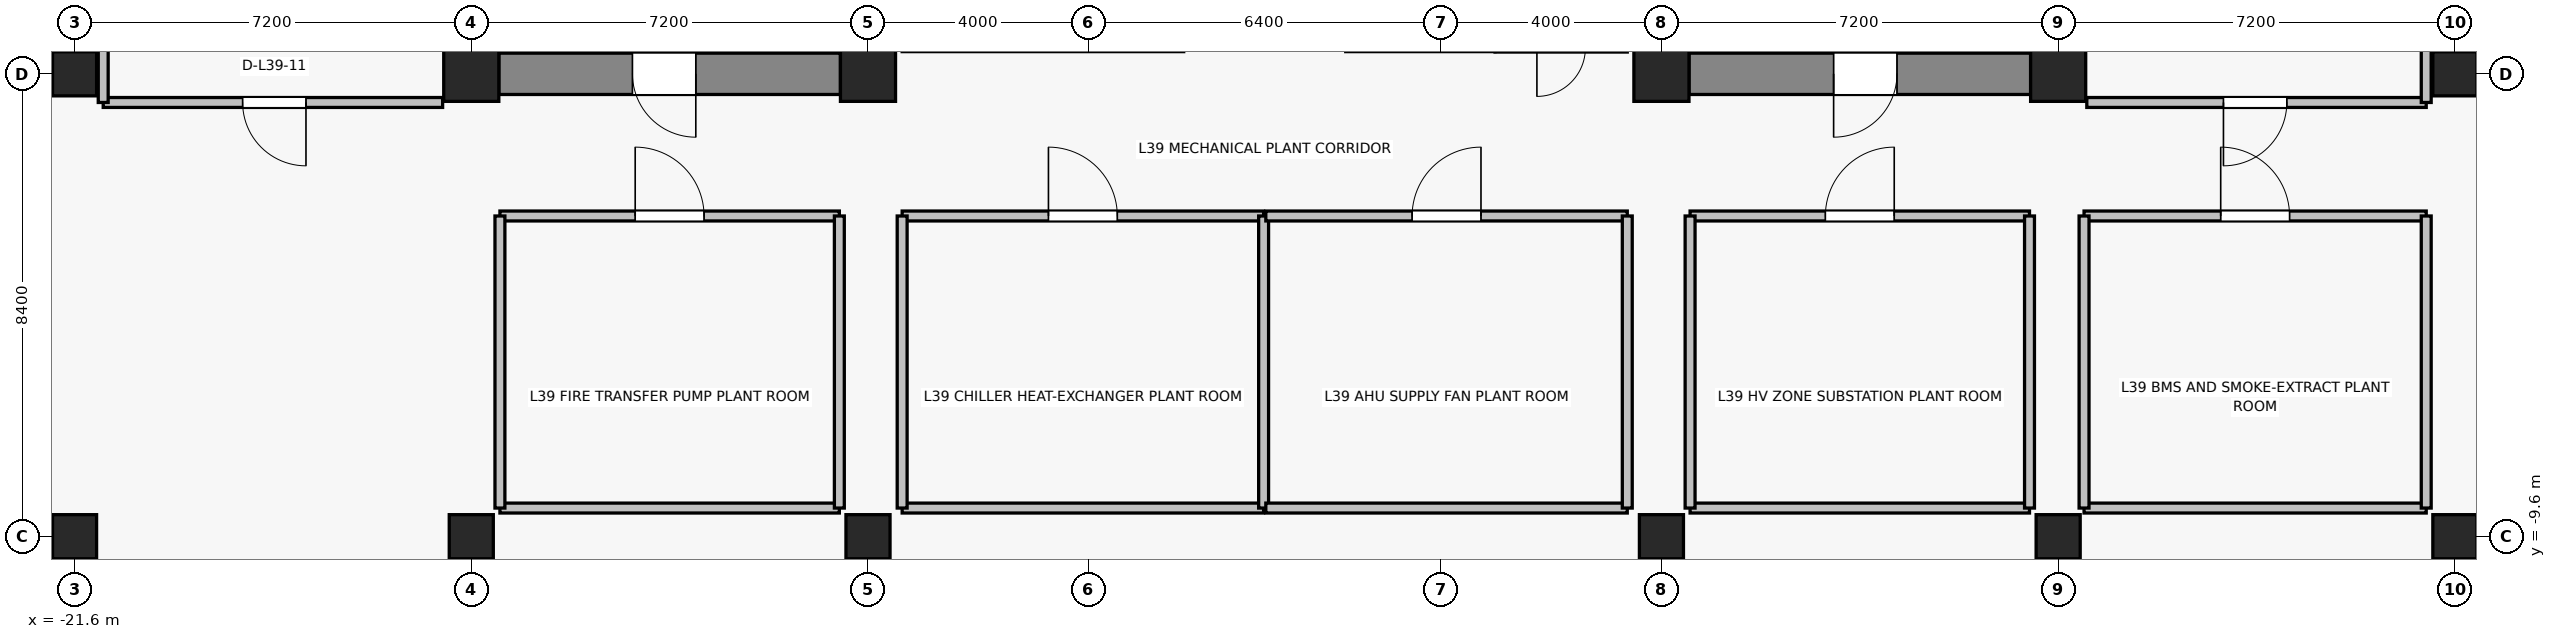
"""IFC4 building model, lengths in metres.
Left out: names, types, materials, properties, quantities, classifications, styles, units other than length and angle.
Written with IfcOpenShell. Run it as: python <this file> out.ifc"""

import sys

from ifc_helpers import new_model, si_unit, direction, frame, frame_2d, origin, origin_2d, place, context, subcontext, project, spatial, rectangle, extrude, source, transform, mapped, element, fill, save


model = new_model("IFC4")
c1 = context("Model", 3, precision=1e-05, world=origin(), true_north=direction((0.0, 1.0)))
c2 = subcontext(c1, "Body", "Model", "MODEL_VIEW")
j1 = project(units=[si_unit("LENGTHUNIT", "METRE"), si_unit("PLANEANGLEUNIT", "RADIAN")], contexts=[c1])
p1 = place(None, origin())
s1 = spatial("IfcSite", under=j1, at=p1, CompositionType="ELEMENT")
p2 = place(p1, origin())
s2 = spatial("IfcBuilding", under=s1, at=p2, CompositionType="ELEMENT")
p3 = place(p2, frame((0.0, 0.0, 139.6)))
s3 = spatial("IfcBuildingStorey", under=s2, at=p3, CompositionType="ELEMENT", Elevation=139.6)
for number, where, z_axis, x_axis in (
    (1, (-14.4, -1.2, 0.0), (0.0, 0.0, 1.0), (1.0, 0.0, 0.0)),
    (2, (-7.2, -1.2, 0.0), (0.0, 0.0, 1.0), (1.0, 0.0, 0.0)),
    (3, (7.2, -1.2, 0.0), (0.0, 0.0, 1.0), (1.0, 0.0, 0.0)),
    (4, (14.4, -1.2, 0.0), (0.0, 0.0, 1.0), (1.0, 0.0, 0.0)),
):
    element("IfcColumn", number, at=place(p3, frame(where, z_axis=z_axis, x_axis=x_axis)), inside=s3, PredefinedType="COLUMN", context=c2, shape_type="SweptSolid", body=[
        extrude(rectangle(XDim=1.0, YDim=1.0, at=origin_2d()), origin(), (0.0, 0.0, 1.0), 6.6),
    ])
for number, where, z_axis, x_axis in (
    (5, (-14.4, -9.6, 0.0), (0.0, 0.0, 1.0), (1.0, 0.0, 0.0)),
    (6, (-7.2, -9.6, 0.0), (0.0, 0.0, 1.0), (1.0, 0.0, 0.0)),
    (7, (7.2, -9.6, 0.0), (0.0, 0.0, 1.0), (1.0, 0.0, 0.0)),
    (8, (14.4, -9.6, 0.0), (0.0, 0.0, 1.0), (1.0, 0.0, 0.0)),
    (9, (-21.6, -9.6, 0.0), (0.0, 0.0, 1.0), (1.0, 0.0, 0.0)),
    (10, (-21.6, -1.2, 0.0), (0.0, 0.0, 1.0), (1.0, 0.0, 0.0)),
    (11, (21.6, -9.6, 0.0), (0.0, 0.0, 1.0), (1.0, 0.0, 0.0)),
    (12, (21.6, -1.2, 0.0), (0.0, 0.0, 1.0), (1.0, 0.0, 0.0)),
):
    element("IfcColumn", number, at=place(p3, frame(where, z_axis=z_axis, x_axis=x_axis)), inside=s3, PredefinedType="COLUMN", context=c2, shape_type="SweptSolid", body=[
        extrude(rectangle(XDim=0.8, YDim=0.8, at=origin_2d()), origin(), (0.0, 0.0, 1.0), 6.6),
    ])
p4 = place(p3, frame((-7.7, -1.2, 0.0), z_axis=(0.0, 0.0, 1.0), x_axis=(-1.0, 0.0, 0.0)))
e13 = element("IfcWall", 13, at=p4, inside=s3, PredefinedType="SHEAR", context=c2, shape_type="SweptSolid", body=[
    extrude(rectangle(XDim=6.2, YDim=0.75, at=frame_2d((3.1, 0.0))), origin(), (0.0, 0.0, 1.0), 6.375),
])
p5 = place(p4, frame((2.625, 0.0, 0.0)))
e14 = element("IfcOpeningElement", 14, at=p5, cuts=e13, PredefinedType="OPENING", context=c2, shape_type="SweptSolid", body=[
    extrude(rectangle(XDim=1.15, YDim=2.15, at=frame_2d((0.575, 1.075))), frame((0.0, 0.385, 0.0), z_axis=(0.0, -1.0, 0.0), x_axis=(1.0, 0.0, 0.0)), (0.0, 0.0, 1.0), 0.77),
])
p6 = place(p3, frame((13.9, -1.2, 0.0), z_axis=(0.0, 0.0, 1.0), x_axis=(-1.0, 0.0, 0.0)))
e15 = element("IfcWall", 15, at=p6, inside=s3, PredefinedType="SHEAR", context=c2, shape_type="SweptSolid", body=[
    extrude(rectangle(XDim=6.2, YDim=0.75, at=frame_2d((3.1, 0.0))), origin(), (0.0, 0.0, 1.0), 6.375),
])
p7 = place(p6, frame((2.425, 0.0, 0.0)))
e16 = element("IfcOpeningElement", 16, at=p7, cuts=e15, PredefinedType="OPENING", context=c2, shape_type="SweptSolid", body=[
    extrude(rectangle(XDim=1.15, YDim=2.15, at=frame_2d((0.575, 1.075))), frame((0.0, 0.385, 0.0), z_axis=(0.0, -1.0, 0.0), x_axis=(1.0, 0.0, 0.0)), (0.0, 0.0, 1.0), 0.77),
])
for number, where, z_axis, x_axis in (
    (17, (-7.4, -0.825, 0.0), (0.0, 0.0, 1.0), (0.0, 1.0, 0.0)),
    (18, (7.4, -0.825, 0.0), (0.0, 0.0, 1.0), (0.0, 1.0, 0.0)),
):
    element("IfcWall", number, at=place(p3, frame(where, z_axis=z_axis, x_axis=x_axis)), inside=s3, PredefinedType="SHEAR", context=c2, shape_type="SweptSolid", body=[
        extrude(rectangle(XDim=4.075, YDim=0.55, at=frame_2d((2.038, 0.0))), origin(), (0.0, 0.0, 1.0), 6.375),
    ])
p8 = place(p3, frame((6.58, -0.73, 0.0), z_axis=(0.0, 0.0, 1.0), x_axis=(-1.0, 0.0, 0.0)))
e19 = element("IfcWall", 19, at=p8, inside=s3, PredefinedType="PARTITIONING", context=c2, shape_type="SweptSolid", body=[
    extrude(rectangle(XDim=2.4, YDim=0.15, at=frame_2d((1.2, 0.0))), origin(), (0.0, 0.0, 1.0), 6.375),
])
p9 = place(p8, frame((0.76, 0.0, 0.0)))
e20 = element("IfcOpeningElement", 20, at=p9, cuts=e19, PredefinedType="OPENING", context=c2, shape_type="SweptSolid", body=[
    extrude(rectangle(XDim=0.88, YDim=2.1, at=frame_2d((0.44, 1.05))), frame((0.0, 0.085, 0.0), z_axis=(0.0, -1.0, 0.0), x_axis=(1.0, 0.0, 0.0)), (0.0, 0.0, 1.0), 0.17),
])
p10 = place(p3, frame((-14.92, -1.72, 0.0), z_axis=(0.0, 0.0, 1.0), x_axis=(-1.0, 0.0, 0.0)))
e21 = element("IfcWall", 21, at=p10, inside=s3, PredefinedType="PARTITIONING", context=c2, shape_type="SweptSolid", body=[
    extrude(rectangle(XDim=6.16, YDim=0.18, at=frame_2d((3.08, 0.0))), origin(), (0.0, 0.0, 1.0), 6.375),
])
p11 = place(p10, frame((2.48, 0.0, 0.0)))
e22 = element("IfcOpeningElement", 22, at=p11, cuts=e21, PredefinedType="OPENING", context=c2, shape_type="SweptSolid", body=[
    extrude(rectangle(XDim=1.15, YDim=2.15, at=frame_2d((0.575, 1.075))), frame((0.0, 0.1, 0.0), z_axis=(0.0, -1.0, 0.0), x_axis=(1.0, 0.0, 0.0)), (0.0, 0.0, 1.0), 0.2),
])
p12 = place(p3, frame((-21.08, -1.72, 0.0), z_axis=(0.0, 0.0, 1.0), x_axis=(0.0, 1.0, 0.0)))
e23 = element("IfcWall", 23, at=p12, inside=s3, PredefinedType="PARTITIONING", context=c2, shape_type="SweptSolid", body=[
    extrude(rectangle(XDim=7.0, YDim=0.18, at=frame_2d((3.5, 0.0))), origin(), (0.0, 0.0, 1.0), 6.375),
])
p13 = place(p3, frame((21.08, -1.72, 0.0), z_axis=(0.0, 0.0, 1.0), x_axis=(-1.0, 0.0, 0.0)))
e24 = element("IfcWall", 24, at=p13, inside=s3, PredefinedType="PARTITIONING", context=c2, shape_type="SweptSolid", body=[
    extrude(rectangle(XDim=6.16, YDim=0.18, at=frame_2d((3.08, 0.0))), origin(), (0.0, 0.0, 1.0), 6.375),
])
p14 = place(p13, frame((2.53, 0.0, 0.0)))
e25 = element("IfcOpeningElement", 25, at=p14, cuts=e24, PredefinedType="OPENING", context=c2, shape_type="SweptSolid", body=[
    extrude(rectangle(XDim=1.15, YDim=2.15, at=frame_2d((0.575, 1.075))), frame((0.0, 0.1, 0.0), z_axis=(0.0, -1.0, 0.0), x_axis=(1.0, 0.0, 0.0)), (0.0, 0.0, 1.0), 0.2),
])
p15 = place(p3, frame((21.08, 5.28, 0.0), z_axis=(0.0, 0.0, 1.0), x_axis=(0.0, -1.0, 0.0)))
e26 = element("IfcWall", 26, at=p15, inside=s3, PredefinedType="PARTITIONING", context=c2, shape_type="SweptSolid", body=[
    extrude(rectangle(XDim=7.0, YDim=0.18, at=frame_2d((3.5, 0.0))), origin(), (0.0, 0.0, 1.0), 5.865),
])
p16 = place(p3, frame((-0.02, -9.08, 0.0), z_axis=(0.0, 0.0, 1.0), x_axis=(-1.0, 0.0, 0.0)))
e27 = element("IfcWall", 27, at=p16, inside=s3, PredefinedType="PARTITIONING", context=c2, shape_type="SweptSolid", body=[
    extrude(rectangle(XDim=6.56, YDim=0.18, at=frame_2d((3.28, 0.0))), origin(), (0.0, 0.0, 1.0), 6.375),
])
p17 = place(p3, frame((-6.58, -3.78, 0.0), z_axis=(0.0, 0.0, 1.0), x_axis=(1.0, 0.0, 0.0)))
e28 = element("IfcWall", 28, at=p17, inside=s3, PredefinedType="PARTITIONING", context=c2, shape_type="SweptSolid", body=[
    extrude(rectangle(XDim=6.56, YDim=0.18, at=frame_2d((3.28, 0.0))), origin(), (0.0, 0.0, 1.0), 6.375),
])
p18 = place(p17, frame((2.655, 0.0, 0.0)))
e29 = element("IfcOpeningElement", 29, at=p18, cuts=e28, PredefinedType="OPENING", context=c2, shape_type="SweptSolid", body=[
    extrude(rectangle(XDim=1.25, YDim=2.15, at=frame_2d((0.625, 1.075))), frame((0.0, 0.1, 0.0), z_axis=(0.0, -1.0, 0.0), x_axis=(1.0, 0.0, 0.0)), (0.0, 0.0, 1.0), 0.2),
])
for number, where, z_axis, x_axis in (
    (30, (-6.58, -9.08, 0.0), (0.0, 0.0, 1.0), (0.0, 1.0, 0.0)),
    (31, (-0.02, -3.78, 0.0), (0.0, 0.0, 1.0), (0.0, -1.0, 0.0)),
):
    element("IfcWall", number, at=place(p3, frame(where, z_axis=z_axis, x_axis=x_axis)), inside=s3, PredefinedType="PARTITIONING", context=c2, shape_type="SweptSolid", body=[
        extrude(rectangle(XDim=5.3, YDim=0.18, at=frame_2d((2.65, 0.0))), origin(), (0.0, 0.0, 1.0), 6.375),
    ])
p19 = place(p3, frame((6.58, -9.08, 0.0), z_axis=(0.0, 0.0, 1.0), x_axis=(-1.0, 0.0, 0.0)))
e32 = element("IfcWall", 32, at=p19, inside=s3, PredefinedType="PARTITIONING", context=c2, shape_type="SweptSolid", body=[
    extrude(rectangle(XDim=6.56, YDim=0.18, at=frame_2d((3.28, 0.0))), origin(), (0.0, 0.0, 1.0), 6.375),
])
p20 = place(p3, frame((0.02, -3.78, 0.0), z_axis=(0.0, 0.0, 1.0), x_axis=(1.0, 0.0, 0.0)))
e33 = element("IfcWall", 33, at=p20, inside=s3, PredefinedType="PARTITIONING", context=c2, shape_type="SweptSolid", body=[
    extrude(rectangle(XDim=6.56, YDim=0.18, at=frame_2d((3.28, 0.0))), origin(), (0.0, 0.0, 1.0), 6.375),
])
p21 = place(p20, frame((2.655, 0.0, 0.0)))
e34 = element("IfcOpeningElement", 34, at=p21, cuts=e33, PredefinedType="OPENING", context=c2, shape_type="SweptSolid", body=[
    extrude(rectangle(XDim=1.25, YDim=2.15, at=frame_2d((0.625, 1.075))), frame((0.0, 0.1, 0.0), z_axis=(0.0, -1.0, 0.0), x_axis=(1.0, 0.0, 0.0)), (0.0, 0.0, 1.0), 0.2),
])
p22 = place(p3, frame((6.58, -3.78, 0.0), z_axis=(0.0, 0.0, 1.0), x_axis=(0.0, -1.0, 0.0)))
e35 = element("IfcWall", 35, at=p22, inside=s3, PredefinedType="PARTITIONING", context=c2, shape_type="SweptSolid", body=[
    extrude(rectangle(XDim=5.3, YDim=0.18, at=frame_2d((2.65, 0.0))), origin(), (0.0, 0.0, 1.0), 6.375),
])
p23 = place(p3, frame((-7.72, -9.08, 0.0), z_axis=(0.0, 0.0, 1.0), x_axis=(-1.0, 0.0, 0.0)))
e36 = element("IfcWall", 36, at=p23, inside=s3, PredefinedType="PARTITIONING", context=c2, shape_type="SweptSolid", body=[
    extrude(rectangle(XDim=6.16, YDim=0.18, at=frame_2d((3.08, 0.0))), origin(), (0.0, 0.0, 1.0), 6.375),
])
p24 = place(p3, frame((-13.88, -3.78, 0.0), z_axis=(0.0, 0.0, 1.0), x_axis=(1.0, 0.0, 0.0)))
e37 = element("IfcWall", 37, at=p24, inside=s3, PredefinedType="PARTITIONING", context=c2, shape_type="SweptSolid", body=[
    extrude(rectangle(XDim=6.16, YDim=0.18, at=frame_2d((3.08, 0.0))), origin(), (0.0, 0.0, 1.0), 6.375),
])
p25 = place(p24, frame((2.455, 0.0, 0.0)))
e38 = element("IfcOpeningElement", 38, at=p25, cuts=e37, PredefinedType="OPENING", context=c2, shape_type="SweptSolid", body=[
    extrude(rectangle(XDim=1.25, YDim=2.15, at=frame_2d((0.625, 1.075))), frame((0.0, 0.1, 0.0), z_axis=(0.0, -1.0, 0.0), x_axis=(1.0, 0.0, 0.0)), (0.0, 0.0, 1.0), 0.2),
])
for number, where, z_axis, x_axis in (
    (39, (-13.88, -9.08, 0.0), (0.0, 0.0, 1.0), (0.0, 1.0, 0.0)),
    (40, (-7.72, -3.78, 0.0), (0.0, 0.0, 1.0), (0.0, -1.0, 0.0)),
):
    element("IfcWall", number, at=place(p3, frame(where, z_axis=z_axis, x_axis=x_axis)), inside=s3, PredefinedType="PARTITIONING", context=c2, shape_type="SweptSolid", body=[
        extrude(rectangle(XDim=5.3, YDim=0.18, at=frame_2d((2.65, 0.0))), origin(), (0.0, 0.0, 1.0), 5.965),
    ])
p26 = place(p3, frame((13.88, -9.08, 0.0), z_axis=(0.0, 0.0, 1.0), x_axis=(-1.0, 0.0, 0.0)))
e41 = element("IfcWall", 41, at=p26, inside=s3, PredefinedType="PARTITIONING", context=c2, shape_type="SweptSolid", body=[
    extrude(rectangle(XDim=6.16, YDim=0.18, at=frame_2d((3.08, 0.0))), origin(), (0.0, 0.0, 1.0), 6.375),
])
p27 = place(p3, frame((7.72, -3.78, 0.0), z_axis=(0.0, 0.0, 1.0), x_axis=(1.0, 0.0, 0.0)))
e42 = element("IfcWall", 42, at=p27, inside=s3, PredefinedType="PARTITIONING", context=c2, shape_type="SweptSolid", body=[
    extrude(rectangle(XDim=6.16, YDim=0.18, at=frame_2d((3.08, 0.0))), origin(), (0.0, 0.0, 1.0), 6.375),
])
p28 = place(p27, frame((2.455, 0.0, 0.0)))
e43 = element("IfcOpeningElement", 43, at=p28, cuts=e42, PredefinedType="OPENING", context=c2, shape_type="SweptSolid", body=[
    extrude(rectangle(XDim=1.25, YDim=2.15, at=frame_2d((0.625, 1.075))), frame((0.0, 0.1, 0.0), z_axis=(0.0, -1.0, 0.0), x_axis=(1.0, 0.0, 0.0)), (0.0, 0.0, 1.0), 0.2),
])
for number, where, z_axis, x_axis in (
    (44, (7.72, -9.08, 0.0), (0.0, 0.0, 1.0), (0.0, 1.0, 0.0)),
    (45, (13.88, -3.78, 0.0), (0.0, 0.0, 1.0), (0.0, -1.0, 0.0)),
):
    element("IfcWall", number, at=place(p3, frame(where, z_axis=z_axis, x_axis=x_axis)), inside=s3, PredefinedType="PARTITIONING", context=c2, shape_type="SweptSolid", body=[
        extrude(rectangle(XDim=5.3, YDim=0.18, at=frame_2d((2.65, 0.0))), origin(), (0.0, 0.0, 1.0), 5.965),
    ])
p29 = place(p3, frame((21.08, -9.08, 0.0), z_axis=(0.0, 0.0, 1.0), x_axis=(-1.0, 0.0, 0.0)))
e46 = element("IfcWall", 46, at=p29, inside=s3, PredefinedType="PARTITIONING", context=c2, shape_type="SweptSolid", body=[
    extrude(rectangle(XDim=6.21, YDim=0.18, at=frame_2d((3.105, 0.0))), origin(), (0.0, 0.0, 1.0), 6.375),
])
p30 = place(p3, frame((14.87, -3.78, 0.0), z_axis=(0.0, 0.0, 1.0), x_axis=(1.0, 0.0, 0.0)))
e47 = element("IfcWall", 47, at=p30, inside=s3, PredefinedType="PARTITIONING", context=c2, shape_type="SweptSolid", body=[
    extrude(rectangle(XDim=6.21, YDim=0.18, at=frame_2d((3.105, 0.0))), origin(), (0.0, 0.0, 1.0), 6.375),
])
p31 = place(p30, frame((2.48, 0.0, 0.0)))
e48 = element("IfcOpeningElement", 48, at=p31, cuts=e47, PredefinedType="OPENING", context=c2, shape_type="SweptSolid", body=[
    extrude(rectangle(XDim=1.25, YDim=2.15, at=frame_2d((0.625, 1.075))), frame((0.0, 0.1, 0.0), z_axis=(0.0, -1.0, 0.0), x_axis=(1.0, 0.0, 0.0)), (0.0, 0.0, 1.0), 0.2),
])
for number, where, z_axis, x_axis in (
    (49, (14.87, -9.08, 0.0), (0.0, 0.0, 1.0), (0.0, 1.0, 0.0)),
    (50, (21.08, -3.78, 0.0), (0.0, 0.0, 1.0), (0.0, -1.0, 0.0)),
):
    element("IfcWall", number, at=place(p3, frame(where, z_axis=z_axis, x_axis=x_axis)), inside=s3, PredefinedType="PARTITIONING", context=c2, shape_type="SweptSolid", body=[
        extrude(rectangle(XDim=5.3, YDim=0.18, at=frame_2d((2.65, 0.0))), origin(), (0.0, 0.0, 1.0), 5.965),
    ])
m1 = source(origin(), c2, "Body", "SweptSolid", [
    extrude(rectangle(XDim=1.15, YDim=2.15, at=frame_2d((0.575, 1.075))), frame((0.0, 0.025, 0.0), z_axis=(0.0, -1.0, 0.0), x_axis=(1.0, 0.0, 0.0)), (0.0, 0.0, 1.0), 0.05),
])
p32 = place(p5, origin())
e51 = element("IfcDoor", 51, at=p32, inside=s3, OperationType="SINGLE_SWING_LEFT", PredefinedType="DOOR", context=c2, shape_type="MappedRepresentation", body=[
    mapped(m1, transform((0.0, 0.0, 0.0), x_axis=(1.0, 0.0, 0.0), y_axis=(0.0, 1.0, 0.0), z_axis=(0.0, 0.0, 1.0), scale=1.0)),
])
fill(e14, e51)
p33 = place(p7, origin())
e52 = element("IfcDoor", 52, at=p33, inside=s3, OperationType="SINGLE_SWING_RIGHT", PredefinedType="DOOR", context=c2, shape_type="MappedRepresentation", body=[
    mapped(m1, transform((0.0, 0.0, 0.0), x_axis=(1.0, 0.0, 0.0), y_axis=(0.0, 1.0, 0.0), z_axis=(0.0, 0.0, 1.0), scale=1.0)),
])
fill(e16, e52)
p34 = place(p11, origin())
e53 = element("IfcDoor", 53, at=p34, inside=s3, OperationType="SINGLE_SWING_LEFT", PredefinedType="DOOR", context=c2, shape_type="MappedRepresentation", body=[
    mapped(m1, transform((0.0, 0.0, 0.0), x_axis=(1.0, 0.0, 0.0), y_axis=(0.0, 1.0, 0.0), z_axis=(0.0, 0.0, 1.0), scale=1.0)),
])
fill(e22, e53)
p35 = place(p14, origin())
e54 = element("IfcDoor", 54, at=p35, inside=s3, OperationType="SINGLE_SWING_RIGHT", PredefinedType="DOOR", context=c2, shape_type="MappedRepresentation", body=[
    mapped(m1, transform((0.0, 0.0, 0.0), x_axis=(1.0, 0.0, 0.0), y_axis=(0.0, 1.0, 0.0), z_axis=(0.0, 0.0, 1.0), scale=1.0)),
])
fill(e25, e54)
m2 = source(origin(), c2, "Body", "SweptSolid", [
    extrude(rectangle(XDim=1.25, YDim=2.15, at=frame_2d((0.625, 1.075))), frame((0.0, 0.025, 0.0), z_axis=(0.0, -1.0, 0.0), x_axis=(1.0, 0.0, 0.0)), (0.0, 0.0, 1.0), 0.05),
])
p36 = place(p18, origin())
e55 = element("IfcDoor", 55, at=p36, inside=s3, OperationType="SINGLE_SWING_LEFT", PredefinedType="DOOR", context=c2, shape_type="MappedRepresentation", body=[
    mapped(m2, transform((0.0, 0.0, 0.0), x_axis=(1.0, 0.0, 0.0), y_axis=(0.0, 1.0, 0.0), z_axis=(0.0, 0.0, 1.0), scale=1.0)),
])
fill(e29, e55)
p37 = place(p21, origin())
e56 = element("IfcDoor", 56, at=p37, inside=s3, OperationType="SINGLE_SWING_RIGHT", PredefinedType="DOOR", context=c2, shape_type="MappedRepresentation", body=[
    mapped(m2, transform((0.0, 0.0, 0.0), x_axis=(1.0, 0.0, 0.0), y_axis=(0.0, 1.0, 0.0), z_axis=(0.0, 0.0, 1.0), scale=1.0)),
])
fill(e34, e56)
p38 = place(p25, origin())
e57 = element("IfcDoor", 57, at=p38, inside=s3, OperationType="SINGLE_SWING_LEFT", PredefinedType="DOOR", context=c2, shape_type="MappedRepresentation", body=[
    mapped(m2, transform((0.0, 0.0, 0.0), x_axis=(1.0, 0.0, 0.0), y_axis=(0.0, 1.0, 0.0), z_axis=(0.0, 0.0, 1.0), scale=1.0)),
])
fill(e38, e57)
p39 = place(p28, origin())
e58 = element("IfcDoor", 58, at=p39, inside=s3, OperationType="SINGLE_SWING_RIGHT", PredefinedType="DOOR", context=c2, shape_type="MappedRepresentation", body=[
    mapped(m2, transform((0.0, 0.0, 0.0), x_axis=(1.0, 0.0, 0.0), y_axis=(0.0, 1.0, 0.0), z_axis=(0.0, 0.0, 1.0), scale=1.0)),
])
fill(e43, e58)
p40 = place(p31, origin())
e59 = element("IfcDoor", 59, at=p40, inside=s3, OperationType="SINGLE_SWING_LEFT", PredefinedType="DOOR", context=c2, shape_type="MappedRepresentation", body=[
    mapped(m2, transform((0.0, 0.0, 0.0), x_axis=(1.0, 0.0, 0.0), y_axis=(0.0, 1.0, 0.0), z_axis=(0.0, 0.0, 1.0), scale=1.0)),
])
fill(e48, e59)
save(model, sys.argv[1])
